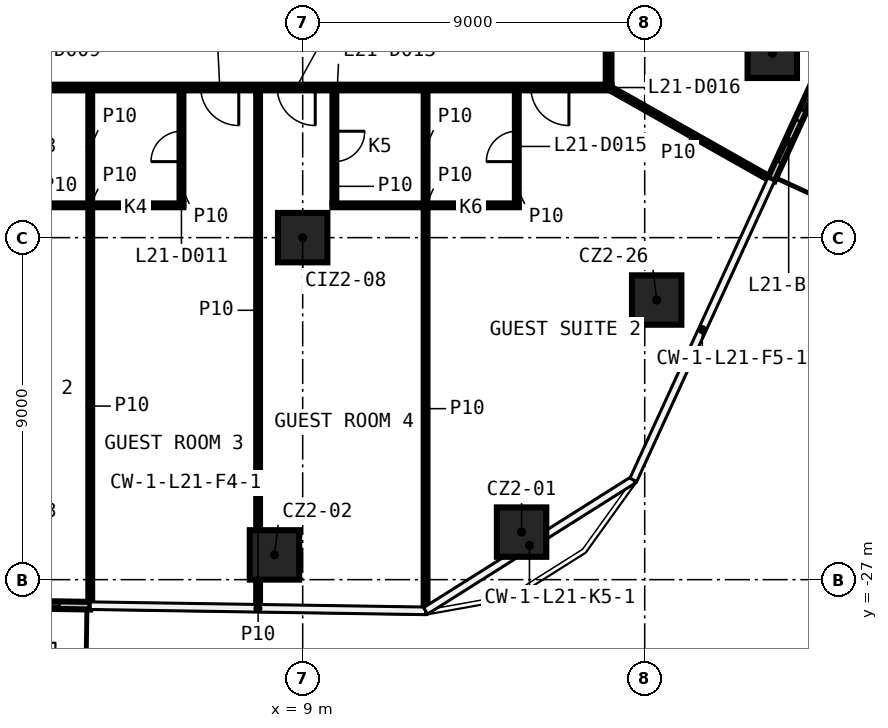
"""IFC4 building model, lengths in metres.
Left out: names, types, materials, properties, quantities, classifications, styles, units other than length and angle.
Written with IfcOpenShell. Run it as: python <this file> out.ifc"""

import sys

from ifc_helpers import new_model, si_unit, direction, frame, frame_2d, origin, origin_2d, place, context, subcontext, project, spatial, rectangle, extrude, element, fill, save


model = new_model("IFC4")
c1 = context("Model", 3, precision=1e-05, world=origin(), true_north=direction((0.0, 1.0)))
c2 = subcontext(c1, "Body", "Model", "MODEL_VIEW")
j1 = project(units=[si_unit("LENGTHUNIT", "METRE"), si_unit("PLANEANGLEUNIT", "RADIAN")], contexts=[c1])
p1 = place(None, origin())
s1 = spatial("IfcSite", under=j1, at=p1, CompositionType="ELEMENT")
p2 = place(p1, origin())
s2 = spatial("IfcBuilding", under=s1, at=p2, CompositionType="ELEMENT")
p3 = place(p2, frame((0.0, 0.0, 102.6)))
s3 = spatial("IfcBuildingStorey", under=s2, at=p3, CompositionType="ELEMENT", Elevation=102.6)
for number, where, z_axis, x_axis in (
    (1, (14.76, -25.749, 0.0), (0.0, 0.0, 1.0), (1.0, 0.0, 0.0)),
    (2, (8.258, -26.349, 0.0), (0.0, 0.0, 1.0), (1.0, 0.0, 0.0)),
    (3, (21.356, -13.15, 0.0), (0.0, 0.0, 1.0), (1.0, 0.0, 0.0)),
    (4, (18.315, -19.642, 0.0), (0.0, 0.0, 1.0), (1.0, 0.0, 0.0)),
    (5, (9.0, -18.0, 0.0), (0.0, 0.0, 1.0), (1.0, 0.0, 0.0)),
):
    element("IfcColumn", number, at=place(p3, frame(where, z_axis=z_axis, x_axis=x_axis)), inside=s3, PredefinedType="COLUMN", context=c2, shape_type="SweptSolid", body=[
        extrude(rectangle(XDim=1.3, YDim=1.3, at=origin_2d()), origin(), (0.0, 0.0, 1.0), 3.3),
    ])
for number, where, z_axis, x_axis in (
    (6, (0.96, -17.15, 0.0), (0.0, 0.0, 1.0), (1.0, 0.0, 0.0)),
    (7, (9.784, -17.15, 0.0), (0.0, 0.0, 1.0), (1.0, 0.0, 0.0)),
):
    element("IfcWall", number, at=place(p3, frame(where, z_axis=z_axis, x_axis=x_axis)), inside=s3, PredefinedType="PARTITIONING", context=c2, shape_type="SweptSolid", body=[
        extrude(rectangle(XDim=4.9, YDim=0.1, at=frame_2d((2.45, 0.0))), origin(), (0.0, 0.0, 1.0), 3.3),
    ])
p4 = place(p3, frame((17.125, -14.05, 0.0), z_axis=(0.0, 0.0, 1.0), x_axis=(-1.0, 0.0, 0.0)))
e8 = element("IfcWall", 8, at=p4, inside=s3, PredefinedType="PARTITIONING", context=c2, shape_type="SweptSolid", body=[
    extrude(rectangle(XDim=34.25, YDim=0.15, at=frame_2d((17.125, 0.0))), origin(), (0.0, 0.0, 1.0), 3.3),
])
p5 = place(p4, frame((32.158, 0.0, 0.0)))
e9 = element("IfcOpeningElement", 9, at=p5, cuts=e8, PredefinedType="OPENING", context=c2, shape_type="SweptSolid", body=[
    extrude(rectangle(XDim=0.9, YDim=2.1, at=frame_2d((0.45, 1.05))), frame((0.0, 0.085, 0.0), z_axis=(0.0, -1.0, 0.0), x_axis=(1.0, 0.0, 0.0)), (0.0, 0.0, 1.0), 0.17),
])
p6 = place(p4, frame((27.561, 0.0, 0.0)))
e10 = element("IfcOpeningElement", 10, at=p6, cuts=e8, PredefinedType="OPENING", context=c2, shape_type="SweptSolid", body=[
    extrude(rectangle(XDim=1.0, YDim=2.1, at=frame_2d((0.5, 1.05))), frame((0.0, 0.085, 0.0), z_axis=(0.0, -1.0, 0.0), x_axis=(1.0, 0.0, 0.0)), (0.0, 0.0, 1.0), 0.17),
])
p7 = place(p4, frame((18.64, 0.0, 0.0)))
e11 = element("IfcOpeningElement", 11, at=p7, cuts=e8, PredefinedType="OPENING", context=c2, shape_type="SweptSolid", body=[
    extrude(rectangle(XDim=1.0, YDim=2.1, at=frame_2d((0.5, 1.05))), frame((0.0, 0.085, 0.0), z_axis=(0.0, -1.0, 0.0), x_axis=(1.0, 0.0, 0.0)), (0.0, 0.0, 1.0), 0.17),
])
p8 = place(p4, frame((16.624, 0.0, 0.0)))
e12 = element("IfcOpeningElement", 12, at=p8, cuts=e8, PredefinedType="OPENING", context=c2, shape_type="SweptSolid", body=[
    extrude(rectangle(XDim=1.0, YDim=2.1, at=frame_2d((0.5, 1.05))), frame((0.0, 0.085, 0.0), z_axis=(0.0, -1.0, 0.0), x_axis=(1.0, 0.0, 0.0)), (0.0, 0.0, 1.0), 0.17),
])
p9 = place(p4, frame((9.807, 0.0, 0.0)))
e13 = element("IfcOpeningElement", 13, at=p9, cuts=e8, PredefinedType="OPENING", context=c2, shape_type="SweptSolid", body=[
    extrude(rectangle(XDim=1.0, YDim=2.1, at=frame_2d((0.5, 1.05))), frame((0.0, 0.085, 0.0), z_axis=(0.0, -1.0, 0.0), x_axis=(1.0, 0.0, 0.0)), (0.0, 0.0, 1.0), 0.17),
])
p10 = place(p4, frame((7.795, 0.0, 0.0)))
e14 = element("IfcOpeningElement", 14, at=p10, cuts=e8, PredefinedType="OPENING", context=c2, shape_type="SweptSolid", body=[
    extrude(rectangle(XDim=1.0, YDim=2.1, at=frame_2d((0.5, 1.05))), frame((0.0, 0.085, 0.0), z_axis=(0.0, -1.0, 0.0), x_axis=(1.0, 0.0, 0.0)), (0.0, 0.0, 1.0), 0.17),
])
p11 = place(p4, frame((1.119, 0.0, 0.0)))
e15 = element("IfcOpeningElement", 15, at=p11, cuts=e8, PredefinedType="OPENING", context=c2, shape_type="SweptSolid", body=[
    extrude(rectangle(XDim=1.0, YDim=2.1, at=frame_2d((0.5, 1.05))), frame((0.0, 0.085, 0.0), z_axis=(0.0, -1.0, 0.0), x_axis=(1.0, 0.0, 0.0)), (0.0, 0.0, 1.0), 0.17),
])
p12 = place(p3, frame((17.05, 13.975, 0.0), z_axis=(0.0, 0.0, 1.0), x_axis=(0.0, -1.0, 0.0)))
e16 = element("IfcWall", 16, at=p12, inside=s3, PredefinedType="PARTITIONING", context=c2, shape_type="SweptSolid", body=[
    extrude(rectangle(XDim=27.95, YDim=0.15, at=frame_2d((13.975, 0.0))), origin(), (0.0, 0.0, 1.0), 3.3),
])
p13 = place(p12, frame((25.274, 0.0, 0.0)))
e17 = element("IfcOpeningElement", 17, at=p13, cuts=e16, PredefinedType="OPENING", context=c2, shape_type="SweptSolid", body=[
    extrude(rectangle(XDim=0.9, YDim=2.1, at=frame_2d((0.45, 1.05))), frame((0.0, 0.085, 0.0), z_axis=(0.0, -1.0, 0.0), x_axis=(1.0, 0.0, 0.0)), (0.0, 0.0, 1.0), 0.17),
])
p14 = place(p12, frame((18.854, 0.0, 0.0)))
e18 = element("IfcOpeningElement", 18, at=p14, cuts=e16, PredefinedType="OPENING", context=c2, shape_type="SweptSolid", body=[
    extrude(rectangle(XDim=1.0, YDim=2.1, at=frame_2d((0.5, 1.05))), frame((0.0, 0.085, 0.0), z_axis=(0.0, -1.0, 0.0), x_axis=(1.0, 0.0, 0.0)), (0.0, 0.0, 1.0), 0.17),
])
p15 = place(p12, frame((17.299, 0.0, 0.0)))
e19 = element("IfcOpeningElement", 19, at=p15, cuts=e16, PredefinedType="OPENING", context=c2, shape_type="SweptSolid", body=[
    extrude(rectangle(XDim=1.0, YDim=2.1, at=frame_2d((0.5, 1.05))), frame((0.0, 0.085, 0.0), z_axis=(0.0, -1.0, 0.0), x_axis=(1.0, 0.0, 0.0)), (0.0, 0.0, 1.0), 0.17),
])
p16 = place(p12, frame((11.171, 0.0, 0.0)))
e20 = element("IfcOpeningElement", 20, at=p16, cuts=e16, PredefinedType="OPENING", context=c2, shape_type="SweptSolid", body=[
    extrude(rectangle(XDim=0.9, YDim=2.1, at=frame_2d((0.45, 1.05))), frame((0.0, 0.085, 0.0), z_axis=(0.0, -1.0, 0.0), x_axis=(1.0, 0.0, 0.0)), (0.0, 0.0, 1.0), 0.17),
])
p17 = place(p12, frame((7.243, 0.0, 0.0)))
e21 = element("IfcOpeningElement", 21, at=p17, cuts=e16, PredefinedType="OPENING", context=c2, shape_type="SweptSolid", body=[
    extrude(rectangle(XDim=0.9, YDim=2.1, at=frame_2d((0.45, 1.05))), frame((0.0, 0.085, 0.0), z_axis=(0.0, -1.0, 0.0), x_axis=(1.0, 0.0, 0.0)), (0.0, 0.0, 1.0), 0.17),
])
p18 = place(p12, frame((2.153, 0.0, 0.0)))
e22 = element("IfcOpeningElement", 22, at=p18, cuts=e16, PredefinedType="OPENING", context=c2, shape_type="SweptSolid", body=[
    extrude(rectangle(XDim=0.9, YDim=2.1, at=frame_2d((0.45, 1.05))), frame((0.0, 0.085, 0.0), z_axis=(0.0, -1.0, 0.0), x_axis=(1.0, 0.0, 0.0)), (0.0, 0.0, 1.0), 0.17),
])
p19 = place(p3, frame((14.634, -17.15, 0.0), z_axis=(0.0, 0.0, 1.0), x_axis=(0.0, 1.0, 0.0)))
e23 = element("IfcWall", 23, at=p19, inside=s3, PredefinedType="PARTITIONING", context=c2, shape_type="SweptSolid", body=[
    extrude(rectangle(XDim=3.025, YDim=0.1, at=frame_2d((1.512, 0.0))), origin(), (0.0, 0.0, 1.0), 3.3),
])
p20 = place(p19, frame((1.15, 0.0, 0.0)))
e24 = element("IfcOpeningElement", 24, at=p20, cuts=e23, PredefinedType="OPENING", context=c2, shape_type="SweptSolid", body=[
    extrude(rectangle(XDim=0.8, YDim=2.1, at=frame_2d((0.4, 1.05))), frame((0.0, 0.06, 0.0), z_axis=(0.0, -1.0, 0.0), x_axis=(1.0, 0.0, 0.0)), (0.0, 0.0, 1.0), 0.12),
])
p21 = place(p3, frame((12.234, -27.801, 0.0), z_axis=(0.0, 0.0, 1.0), x_axis=(0.0, 1.0, 0.0)))
e25 = element("IfcWall", 25, at=p21, inside=s3, PredefinedType="PARTITIONING", context=c2, shape_type="SweptSolid", body=[
    extrude(rectangle(XDim=10.601, YDim=0.1, at=frame_2d((5.3, 0.0))), origin(), (0.0, 0.0, 1.0), 3.3),
])
p22 = place(p3, frame((12.234, -17.1, 0.0), z_axis=(0.0, 0.0, 1.0), x_axis=(0.0, 1.0, 0.0)))
e26 = element("IfcWall", 26, at=p22, inside=s3, PredefinedType="PARTITIONING", context=c2, shape_type="SweptSolid", body=[
    extrude(rectangle(XDim=2.975, YDim=0.1, at=frame_2d((1.488, 0.0))), origin(), (0.0, 0.0, 1.0), 3.3),
])
p23 = place(p3, frame((9.834, -14.125, 0.0), z_axis=(0.0, 0.0, 1.0), x_axis=(0.0, -1.0, 0.0)))
e27 = element("IfcWall", 27, at=p23, inside=s3, PredefinedType="PARTITIONING", context=c2, shape_type="SweptSolid", body=[
    extrude(rectangle(XDim=2.975, YDim=0.1, at=frame_2d((1.488, 0.0))), origin(), (0.0, 0.0, 1.0), 3.3),
])
p24 = place(p23, frame((1.075, 0.0, 0.0)))
e28 = element("IfcOpeningElement", 28, at=p24, cuts=e27, PredefinedType="OPENING", context=c2, shape_type="SweptSolid", body=[
    extrude(rectangle(XDim=0.8, YDim=2.1, at=frame_2d((0.4, 1.05))), frame((0.0, 0.06, 0.0), z_axis=(0.0, -1.0, 0.0), x_axis=(1.0, 0.0, 0.0)), (0.0, 0.0, 1.0), 0.12),
])
p25 = place(p3, frame((7.827, -27.733, 0.0), z_axis=(0.0, 0.0, 1.0), x_axis=(0.0, 1.0, 0.0)))
e29 = element("IfcWall", 29, at=p25, inside=s3, PredefinedType="PARTITIONING", context=c2, shape_type="SweptSolid", body=[
    extrude(rectangle(XDim=0.734, YDim=0.1, at=frame_2d((0.367, 0.0))), origin(), (0.0, 0.0, 1.0), 3.3),
])
p26 = place(p3, frame((7.827, -25.699, 0.0), z_axis=(0.0, 0.0, 1.0), x_axis=(0.0, 1.0, 0.0)))
e30 = element("IfcWall", 30, at=p26, inside=s3, PredefinedType="PARTITIONING", context=c2, shape_type="SweptSolid", body=[
    extrude(rectangle(XDim=11.574, YDim=0.1, at=frame_2d((5.787, 0.0))), origin(), (0.0, 0.0, 1.0), 3.3),
])
p27 = place(p3, frame((5.81, -17.15, 0.0), z_axis=(0.0, 0.0, 1.0), x_axis=(0.0, 1.0, 0.0)))
e31 = element("IfcWall", 31, at=p27, inside=s3, PredefinedType="PARTITIONING", context=c2, shape_type="SweptSolid", body=[
    extrude(rectangle(XDim=3.025, YDim=0.1, at=frame_2d((1.512, 0.0))), origin(), (0.0, 0.0, 1.0), 3.3),
])
p28 = place(p27, frame((1.15, 0.0, 0.0)))
e32 = element("IfcOpeningElement", 32, at=p28, cuts=e31, PredefinedType="OPENING", context=c2, shape_type="SweptSolid", body=[
    extrude(rectangle(XDim=0.8, YDim=2.1, at=frame_2d((0.4, 1.05))), frame((0.0, 0.06, 0.0), z_axis=(0.0, -1.0, 0.0), x_axis=(1.0, 0.0, 0.0)), (0.0, 0.0, 1.0), 0.12),
])
p29 = place(p3, frame((3.41, -27.665, 0.0), z_axis=(0.0, 0.0, 1.0), x_axis=(0.0, 1.0, 0.0)))
e33 = element("IfcWall", 33, at=p29, inside=s3, PredefinedType="PARTITIONING", context=c2, shape_type="SweptSolid", body=[
    extrude(rectangle(XDim=10.465, YDim=0.1, at=frame_2d((5.232, 0.0))), origin(), (0.0, 0.0, 1.0), 3.3),
])
p30 = place(p3, frame((3.41, -17.1, 0.0), z_axis=(0.0, 0.0, 1.0), x_axis=(0.0, 1.0, 0.0)))
e34 = element("IfcWall", 34, at=p30, inside=s3, PredefinedType="PARTITIONING", context=c2, shape_type="SweptSolid", body=[
    extrude(rectangle(XDim=2.975, YDim=0.1, at=frame_2d((1.488, 0.0))), origin(), (0.0, 0.0, 1.0), 3.3),
])
p31 = place(p3, frame((17.05, -14.05, 0.0), z_axis=(0.0, 0.0, 1.0), x_axis=(0.87059349, -0.492003023537, 0.0)))
e35 = element("IfcWall", 35, at=p31, inside=s3, PredefinedType="PARTITIONING", context=c2, shape_type="SweptSolid", body=[
    extrude(rectangle(XDim=4.895, YDim=0.1, at=frame_2d((2.448, 0.0))), origin(), (0.0, 0.0, 1.0), 3.3),
])
p32 = place(p3, frame((-5.424, -27.549, 0.0), z_axis=(0.0, 0.0, 1.0), x_axis=(0.999881101657, -0.015420199401, 0.0)))
e36 = element("IfcWall", 36, at=p32, inside=s3, PredefinedType="SOLIDWALL", context=c2, shape_type="SweptSolid", body=[
    extrude(rectangle(XDim=8.834, YDim=0.2, at=frame_2d((4.417, 0.0))), origin(), (0.0, 0.0, 1.0), 3.25),
])
p33 = place(p32, frame((0.5, 0.0, 0.6)))
e37 = element("IfcOpeningElement", 37, at=p33, cuts=e36, PredefinedType="OPENING", context=c2, shape_type="SweptSolid", body=[
    extrude(rectangle(XDim=1.6, YDim=2.4, at=frame_2d((0.8, 1.2))), frame((0.0, 0.11, 0.0), z_axis=(0.0, -1.0, 0.0), x_axis=(1.0, 0.0, 0.0)), (0.0, 0.0, 1.0), 0.22),
])
p34 = place(p32, frame((2.4, 0.0, 0.0)))
e38 = element("IfcOpeningElement", 38, at=p34, cuts=e36, PredefinedType="OPENING", context=c2, shape_type="SweptSolid", body=[
    extrude(rectangle(XDim=1.2, YDim=2.4, at=frame_2d((0.6, 1.2))), frame((0.0, 0.11, 0.0), z_axis=(0.0, -1.0, 0.0), x_axis=(1.0, 0.0, 0.0)), (0.0, 0.0, 1.0), 0.22),
])
p35 = place(p32, frame((6.417, 0.0, 0.6)))
e39 = element("IfcOpeningElement", 39, at=p35, cuts=e36, PredefinedType="OPENING", context=c2, shape_type="SweptSolid", body=[
    extrude(rectangle(XDim=1.6, YDim=2.4, at=frame_2d((0.8, 1.2))), frame((0.0, 0.11, 0.0), z_axis=(0.0, -1.0, 0.0), x_axis=(1.0, 0.0, 0.0)), (0.0, 0.0, 1.0), 0.22),
])
p36 = place(p32, frame((4.917, 0.0, 0.0)))
e40 = element("IfcOpeningElement", 40, at=p36, cuts=e36, PredefinedType="OPENING", context=c2, shape_type="SweptSolid", body=[
    extrude(rectangle(XDim=1.2, YDim=2.4, at=frame_2d((0.6, 1.2))), frame((0.0, 0.11, 0.0), z_axis=(0.0, -1.0, 0.0), x_axis=(1.0, 0.0, 0.0)), (0.0, 0.0, 1.0), 0.22),
])
p37 = place(p3, frame((21.329, -16.468, 0.0), z_axis=(0.0, 0.0, 1.0), x_axis=(0.417117833448, 0.908852415423, 0.0)))
e41 = element("IfcWall", 41, at=p37, inside=s3, PredefinedType="SOLIDWALL", context=c2, shape_type="SweptSolid", body=[
    extrude(rectangle(XDim=21.761, YDim=0.2, at=frame_2d((10.881, 0.0))), origin(), (0.0, 0.0, 1.0), 3.25),
])
p38 = place(p37, frame((2.0, 0.0, 0.6)))
e42 = element("IfcOpeningElement", 42, at=p38, cuts=e41, PredefinedType="OPENING", context=c2, shape_type="SweptSolid", body=[
    extrude(rectangle(XDim=1.6, YDim=2.4, at=frame_2d((0.8, 1.2))), frame((0.0, 0.11, 0.0), z_axis=(0.0, -1.0, 0.0), x_axis=(1.0, 0.0, 0.0)), (0.0, 0.0, 1.0), 0.22),
])
p39 = place(p37, frame((0.5, 0.0, 0.0)))
e43 = element("IfcOpeningElement", 43, at=p39, cuts=e41, PredefinedType="OPENING", context=c2, shape_type="SweptSolid", body=[
    extrude(rectangle(XDim=1.2, YDim=2.4, at=frame_2d((0.6, 1.2))), frame((0.0, 0.11, 0.0), z_axis=(0.0, -1.0, 0.0), x_axis=(1.0, 0.0, 0.0)), (0.0, 0.0, 1.0), 0.22),
])
p40 = place(p37, frame((6.352, 0.0, 0.6)))
e44 = element("IfcOpeningElement", 44, at=p40, cuts=e41, PredefinedType="OPENING", context=c2, shape_type="SweptSolid", body=[
    extrude(rectangle(XDim=1.6, YDim=2.4, at=frame_2d((0.8, 1.2))), frame((0.0, 0.11, 0.0), z_axis=(0.0, -1.0, 0.0), x_axis=(1.0, 0.0, 0.0)), (0.0, 0.0, 1.0), 0.22),
])
p41 = place(p37, frame((4.852, 0.0, 0.0)))
e45 = element("IfcOpeningElement", 45, at=p41, cuts=e41, PredefinedType="OPENING", context=c2, shape_type="SweptSolid", body=[
    extrude(rectangle(XDim=1.2, YDim=2.4, at=frame_2d((0.6, 1.2))), frame((0.0, 0.11, 0.0), z_axis=(0.0, -1.0, 0.0), x_axis=(1.0, 0.0, 0.0)), (0.0, 0.0, 1.0), 0.22),
])
p42 = place(p37, frame((9.205, 0.0, 0.6)))
e46 = element("IfcOpeningElement", 46, at=p42, cuts=e41, PredefinedType="OPENING", context=c2, shape_type="SweptSolid", body=[
    extrude(rectangle(XDim=1.6, YDim=2.4, at=frame_2d((0.8, 1.2))), frame((0.0, 0.11, 0.0), z_axis=(0.0, -1.0, 0.0), x_axis=(1.0, 0.0, 0.0)), (0.0, 0.0, 1.0), 0.22),
])
p43 = place(p37, frame((11.205, 0.0, 0.0)))
e47 = element("IfcOpeningElement", 47, at=p43, cuts=e41, PredefinedType="OPENING", context=c2, shape_type="SweptSolid", body=[
    extrude(rectangle(XDim=1.2, YDim=2.4, at=frame_2d((0.6, 1.2))), frame((0.0, 0.11, 0.0), z_axis=(0.0, -1.0, 0.0), x_axis=(1.0, 0.0, 0.0)), (0.0, 0.0, 1.0), 0.22),
])
p44 = place(p37, frame((15.057, 0.0, 0.6)))
e48 = element("IfcOpeningElement", 48, at=p44, cuts=e41, PredefinedType="OPENING", context=c2, shape_type="SweptSolid", body=[
    extrude(rectangle(XDim=1.6, YDim=2.4, at=frame_2d((0.8, 1.2))), frame((0.0, 0.11, 0.0), z_axis=(0.0, -1.0, 0.0), x_axis=(1.0, 0.0, 0.0)), (0.0, 0.0, 1.0), 0.22),
])
p45 = place(p37, frame((13.557, 0.0, 0.0)))
e49 = element("IfcOpeningElement", 49, at=p45, cuts=e41, PredefinedType="OPENING", context=c2, shape_type="SweptSolid", body=[
    extrude(rectangle(XDim=1.2, YDim=2.4, at=frame_2d((0.6, 1.2))), frame((0.0, 0.11, 0.0), z_axis=(0.0, -1.0, 0.0), x_axis=(1.0, 0.0, 0.0)), (0.0, 0.0, 1.0), 0.22),
])
p46 = place(p37, frame((19.909, 0.0, 0.6)))
e50 = element("IfcOpeningElement", 50, at=p46, cuts=e41, PredefinedType="OPENING", context=c2, shape_type="SweptSolid", body=[
    extrude(rectangle(XDim=1.6, YDim=2.4, at=frame_2d((0.8, 1.2))), frame((0.0, 0.11, 0.0), z_axis=(0.0, -1.0, 0.0), x_axis=(1.0, 0.0, 0.0)), (0.0, 0.0, 1.0), 0.22),
])
p47 = place(p37, frame((18.409, 0.0, 0.0)))
e51 = element("IfcOpeningElement", 51, at=p47, cuts=e41, PredefinedType="OPENING", context=c2, shape_type="SweptSolid", body=[
    extrude(rectangle(XDim=1.2, YDim=2.4, at=frame_2d((0.6, 1.2))), frame((0.0, 0.11, 0.0), z_axis=(0.0, -1.0, 0.0), x_axis=(1.0, 0.0, 0.0)), (0.0, 0.0, 1.0), 0.22),
])
p48 = place(p28, origin())
e52 = element("IfcDoor", 52, at=p48, inside=s3, OperationType="SINGLE_SWING_LEFT", PredefinedType="DOOR", context=c2, shape_type="SweptSolid", body=[
    extrude(rectangle(XDim=0.8, YDim=2.1, at=frame_2d((0.4, 1.05))), frame((0.0, 0.025, 0.0), z_axis=(0.0, -1.0, 0.0), x_axis=(1.0, 0.0, 0.0)), (0.0, 0.0, 1.0), 0.05),
])
fill(e32, e52)
p49 = place(p9, origin())
e53 = element("IfcDoor", 53, at=p49, inside=s3, OperationType="SINGLE_SWING_RIGHT", PredefinedType="DOOR", context=c2, shape_type="SweptSolid", body=[
    extrude(rectangle(XDim=1.0, YDim=2.1, at=frame_2d((0.5, 1.05))), frame((0.0, 0.025, 0.0), z_axis=(0.0, -1.0, 0.0), x_axis=(1.0, 0.0, 0.0)), (0.0, 0.0, 1.0), 0.05),
])
fill(e13, e53)
p50 = place(p24, origin())
e54 = element("IfcDoor", 54, at=p50, inside=s3, OperationType="SINGLE_SWING_RIGHT", PredefinedType="DOOR", context=c2, shape_type="SweptSolid", body=[
    extrude(rectangle(XDim=0.8, YDim=2.1, at=frame_2d((0.4, 1.05))), frame((0.0, 0.025, 0.0), z_axis=(0.0, -1.0, 0.0), x_axis=(1.0, 0.0, 0.0)), (0.0, 0.0, 1.0), 0.05),
])
fill(e28, e54)
p51 = place(p10, origin())
e55 = element("IfcDoor", 55, at=p51, inside=s3, OperationType="SINGLE_SWING_LEFT", PredefinedType="DOOR", context=c2, shape_type="SweptSolid", body=[
    extrude(rectangle(XDim=1.0, YDim=2.1, at=frame_2d((0.5, 1.05))), frame((0.0, 0.025, 0.0), z_axis=(0.0, -1.0, 0.0), x_axis=(1.0, 0.0, 0.0)), (0.0, 0.0, 1.0), 0.05),
])
fill(e14, e55)
p52 = place(p20, origin())
e56 = element("IfcDoor", 56, at=p52, inside=s3, OperationType="SINGLE_SWING_LEFT", PredefinedType="DOOR", context=c2, shape_type="SweptSolid", body=[
    extrude(rectangle(XDim=0.8, YDim=2.1, at=frame_2d((0.4, 1.05))), frame((0.0, 0.025, 0.0), z_axis=(0.0, -1.0, 0.0), x_axis=(1.0, 0.0, 0.0)), (0.0, 0.0, 1.0), 0.05),
])
fill(e24, e56)
p53 = place(p11, origin())
e57 = element("IfcDoor", 57, at=p53, inside=s3, OperationType="SINGLE_SWING_RIGHT", PredefinedType="DOOR", context=c2, shape_type="SweptSolid", body=[
    extrude(rectangle(XDim=1.0, YDim=2.1, at=frame_2d((0.5, 1.05))), frame((0.0, 0.025, 0.0), z_axis=(0.0, -1.0, 0.0), x_axis=(1.0, 0.0, 0.0)), (0.0, 0.0, 1.0), 0.05),
])
fill(e15, e57)
p54 = place(p35, origin())
e58 = element("IfcWindow", 58, at=p54, inside=s3, PartitioningType="SINGLE_PANEL", PredefinedType="WINDOW", context=c2, shape_type="SweptSolid", body=[
    extrude(rectangle(XDim=1.6, YDim=2.4, at=frame_2d((0.8, 1.2))), frame((0.0, 0.03, 0.0), z_axis=(0.0, -1.0, 0.0), x_axis=(1.0, 0.0, 0.0)), (0.0, 0.0, 1.0), 0.06),
])
fill(e39, e58)
p55 = place(p38, origin())
e59 = element("IfcWindow", 59, at=p55, inside=s3, PartitioningType="SINGLE_PANEL", PredefinedType="WINDOW", context=c2, shape_type="SweptSolid", body=[
    extrude(rectangle(XDim=1.6, YDim=2.4, at=frame_2d((0.8, 1.2))), frame((0.0, 0.03, 0.0), z_axis=(0.0, -1.0, 0.0), x_axis=(1.0, 0.0, 0.0)), (0.0, 0.0, 1.0), 0.06),
])
fill(e42, e59)
p56 = place(p39, origin())
e60 = element("IfcDoor", 60, at=p56, inside=s3, OperationType="SLIDING_TO_LEFT", PredefinedType="DOOR", context=c2, shape_type="SweptSolid", body=[
    extrude(rectangle(XDim=1.2, YDim=2.4, at=frame_2d((0.6, 1.2))), frame((0.0, 0.025, 0.0), z_axis=(0.0, -1.0, 0.0), x_axis=(1.0, 0.0, 0.0)), (0.0, 0.0, 1.0), 0.05),
])
fill(e43, e60)
save(model, sys.argv[1])
